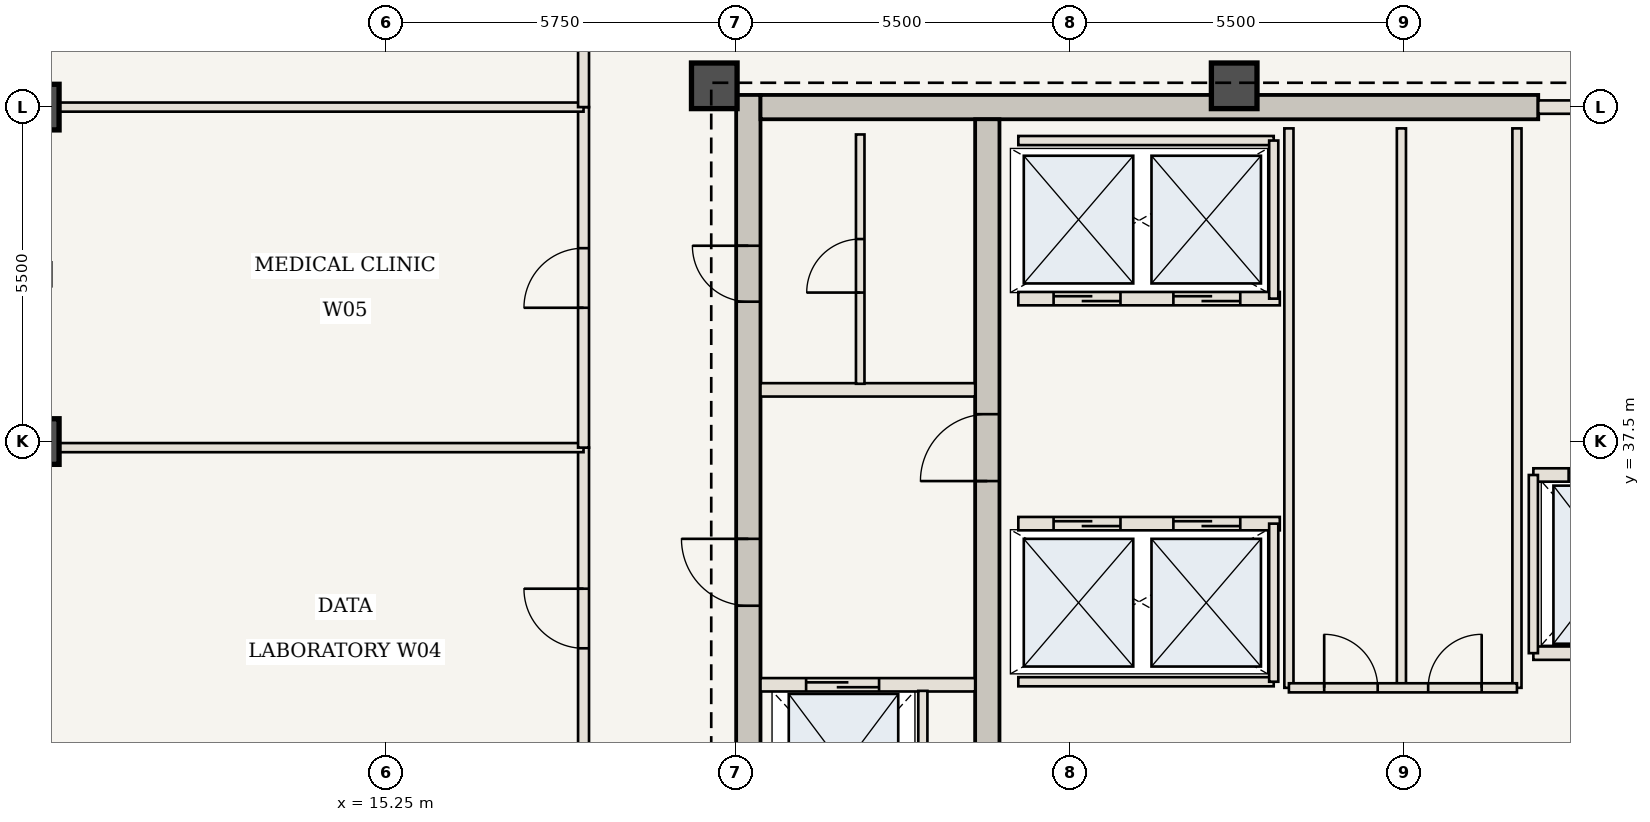
"""IFC4 building model, lengths in metres.
Left out: names, types, materials, properties, quantities, classifications, styles, units other than length and angle.
Written with IfcOpenShell. Run it as: python <this file> out.ifc"""

import sys

from ifc_helpers import new_model, si_unit, direction, frame, frame_2d, origin, origin_2d, place, context, subcontext, project, spatial, rectangle, extrude, element, fill, save


model = new_model("IFC4")
c1 = context("Model", 3, precision=1e-05, world=origin(), true_north=direction((0.0, 1.0)))
c2 = subcontext(c1, "Body", "Model", "MODEL_VIEW")
j1 = project(units=[si_unit("LENGTHUNIT", "METRE"), si_unit("PLANEANGLEUNIT", "RADIAN")], contexts=[c1])
p1 = place(None, origin())
s1 = spatial("IfcSite", under=j1, at=p1, CompositionType="ELEMENT")
p2 = place(p1, origin())
s2 = spatial("IfcBuilding", under=s1, at=p2, CompositionType="ELEMENT")
p3 = place(p2, frame((0.0, 0.0, 304.5)))
s3 = spatial("IfcBuildingStorey", under=s2, at=p3, CompositionType="ELEMENT", Elevation=304.5)
p4 = place(p3, frame((21.21, 30.6, 0.0), z_axis=(0.0, 0.0, 1.0), x_axis=(0.0, 1.0, 0.0)))
e1 = element("IfcWall", 1, at=p4, inside=s3, PredefinedType="SHEAR", context=c2, shape_type="SweptSolid", body=[
    extrude(rectangle(XDim=12.6, YDim=0.4, at=frame_2d((6.3, 0.0))), origin(), (0.0, 0.0, 1.0), 3.85),
])
p5 = place(p4, frame((4.2, 0.0, 0.0)))
e2 = element("IfcOpeningElement", 2, at=p5, cuts=e1, PredefinedType="OPENING", context=c2, shape_type="SweptSolid", body=[
    extrude(rectangle(XDim=1.1, YDim=2.15, at=frame_2d((0.55, 1.075))), frame((0.0, 0.21, 0.0), z_axis=(0.0, -1.0, 0.0), x_axis=(1.0, 0.0, 0.0)), (0.0, 0.0, 1.0), 0.42),
])
p6 = place(p4, frame((9.2, 0.0, 0.0)))
e3 = element("IfcOpeningElement", 3, at=p6, cuts=e1, PredefinedType="OPENING", context=c2, shape_type="SweptSolid", body=[
    extrude(rectangle(XDim=0.92, YDim=2.1, at=frame_2d((0.46, 1.05))), frame((0.0, 0.21, 0.0), z_axis=(0.0, -1.0, 0.0), x_axis=(1.0, 0.0, 0.0)), (0.0, 0.0, 1.0), 0.42),
])
p7 = place(p3, frame((21.41, 43.0, 0.0), z_axis=(0.0, 0.0, 1.0), x_axis=(1.0, 0.0, 0.0)))
e4 = element("IfcWall", 4, at=p7, inside=s3, PredefinedType="SHEAR", context=c2, shape_type="SweptSolid", body=[
    extrude(rectangle(XDim=12.79, YDim=0.4, at=frame_2d((6.395, 0.0))), origin(), (0.0, 0.0, 1.0), 3.85),
])
p8 = place(p3, frame((25.14, 30.6, 0.0), z_axis=(0.0, 0.0, 1.0), x_axis=(0.0, 1.0, 0.0)))
e5 = element("IfcWall", 5, at=p8, inside=s3, PredefinedType="SHEAR", context=c2, shape_type="SweptSolid", body=[
    extrude(rectangle(XDim=12.2, YDim=0.4, at=frame_2d((6.1, 0.0))), origin(), (0.0, 0.0, 1.0), 3.85),
])
p9 = place(p8, frame((6.25, 0.0, 0.0)))
e6 = element("IfcOpeningElement", 6, at=p9, cuts=e5, PredefinedType="OPENING", context=c2, shape_type="SweptSolid", body=[
    extrude(rectangle(XDim=1.1, YDim=2.15, at=frame_2d((0.55, 1.075))), frame((0.0, 0.21, 0.0), z_axis=(0.0, -1.0, 0.0), x_axis=(1.0, 0.0, 0.0)), (0.0, 0.0, 1.0), 0.42),
])
for number, where, z_axis, x_axis in (
    (7, (29.2, 43.35, 0.0), (0.0, 0.0, 1.0), (1.0, 0.0, 0.0)),
    (8, (20.65, 43.35, 0.0), (0.0, 0.0, 1.0), (1.0, 0.0, 0.0)),
    (9, (9.5, 37.5, 0.0), (0.0, 0.0, 1.0), (1.0, 0.0, 0.0)),
    (10, (9.5, 43.0, 0.0), (0.0, 0.0, 1.0), (1.0, 0.0, 0.0)),
):
    element("IfcColumn", number, at=place(p3, frame(where, z_axis=z_axis, x_axis=x_axis)), inside=s3, PredefinedType="COLUMN", context=c2, shape_type="SweptSolid", body=[
        extrude(rectangle(XDim=0.75, YDim=0.75, at=origin_2d()), origin(), (0.0, 0.0, 1.0), 3.85),
    ])
p10 = place(p3, frame((21.41, 33.5, 0.0), z_axis=(0.0, 0.0, 1.0), x_axis=(1.0, 0.0, 0.0)))
e11 = element("IfcWall", 11, at=p10, inside=s3, PredefinedType="STANDARD", context=c2, shape_type="SweptSolid", body=[
    extrude(rectangle(XDim=3.53, YDim=0.22, at=frame_2d((1.765, 0.0))), origin(), (0.0, 0.0, 1.0), 3.63),
])
p11 = place(p10, frame((0.75, 0.0, 0.0)))
e12 = element("IfcOpeningElement", 12, at=p11, cuts=e11, PredefinedType="OPENING", context=c2, shape_type="SweptSolid", body=[
    extrude(rectangle(XDim=1.2, YDim=2.2, at=frame_2d((0.6, 1.1))), frame((0.0, 0.12, 0.0), z_axis=(0.0, -1.0, 0.0), x_axis=(1.0, 0.0, 0.0)), (0.0, 0.0, 1.0), 0.24),
])
p12 = place(p3, frame((24.08, 30.75, 0.0), z_axis=(0.0, 0.0, 1.0), x_axis=(0.0, 1.0, 0.0)))
e13 = element("IfcWall", 13, at=p12, inside=s3, PredefinedType="STANDARD", context=c2, shape_type="SweptSolid", body=[
    extrude(rectangle(XDim=2.65, YDim=0.15, at=frame_2d((1.325, 0.0))), origin(), (0.0, 0.0, 1.0), 3.63),
])
p13 = place(p3, frame((21.41, 38.35, 0.0), z_axis=(0.0, 0.0, 1.0), x_axis=(1.0, 0.0, 0.0)))
e14 = element("IfcWall", 14, at=p13, inside=s3, PredefinedType="STANDARD", context=c2, shape_type="SweptSolid", body=[
    extrude(rectangle(XDim=3.53, YDim=0.22, at=frame_2d((1.765, 0.0))), origin(), (0.0, 0.0, 1.0), 3.63),
])
p14 = place(p3, frame((23.05, 38.45, 0.0), z_axis=(0.0, 0.0, 1.0), x_axis=(0.0, 1.0, 0.0)))
e15 = element("IfcWall", 15, at=p14, inside=s3, PredefinedType="STANDARD", context=c2, shape_type="SweptSolid", body=[
    extrude(rectangle(XDim=4.1, YDim=0.14, at=frame_2d((2.05, 0.0))), origin(), (0.0, 0.0, 1.0), 3.63),
])
p15 = place(p14, frame((1.5, 0.0, 0.0)))
e16 = element("IfcOpeningElement", 16, at=p15, cuts=e15, PredefinedType="OPENING", context=c2, shape_type="SweptSolid", body=[
    extrude(rectangle(XDim=0.88, YDim=2.1, at=frame_2d((0.44, 1.05))), frame((0.0, 0.08, 0.0), z_axis=(0.0, -1.0, 0.0), x_axis=(1.0, 0.0, 0.0)), (0.0, 0.0, 1.0), 0.16),
])
p16 = place(p3, frame((25.65, 36.15, 0.0), z_axis=(0.0, 0.0, 1.0), x_axis=(1.0, 0.0, 0.0)))
e17 = element("IfcWall", 17, at=p16, inside=s3, PredefinedType="STANDARD", context=c2, shape_type="SweptSolid", body=[
    extrude(rectangle(XDim=4.3, YDim=0.22, at=frame_2d((2.15, 0.0))), origin(), (0.0, 0.0, 1.0), 3.63),
])
p17 = place(p16, frame((0.58, 0.0, 0.0)))
e18 = element("IfcOpeningElement", 18, at=p17, cuts=e17, PredefinedType="OPENING", context=c2, shape_type="SweptSolid", body=[
    extrude(rectangle(XDim=1.1, YDim=2.15, at=frame_2d((0.55, 1.075))), frame((0.0, 0.12, 0.0), z_axis=(0.0, -1.0, 0.0), x_axis=(1.0, 0.0, 0.0)), (0.0, 0.0, 1.0), 0.24),
])
p18 = place(p16, frame((2.55, 0.0, 0.0)))
e19 = element("IfcOpeningElement", 19, at=p18, cuts=e17, PredefinedType="OPENING", context=c2, shape_type="SweptSolid", body=[
    extrude(rectangle(XDim=1.1, YDim=2.15, at=frame_2d((0.55, 1.075))), frame((0.0, 0.12, 0.0), z_axis=(0.0, -1.0, 0.0), x_axis=(1.0, 0.0, 0.0)), (0.0, 0.0, 1.0), 0.24),
])
p19 = place(p3, frame((25.65, 33.55, 0.0), z_axis=(0.0, 0.0, 1.0), x_axis=(1.0, 0.0, 0.0)))
e20 = element("IfcWall", 20, at=p19, inside=s3, PredefinedType="STANDARD", context=c2, shape_type="SweptSolid", body=[
    extrude(rectangle(XDim=4.2, YDim=0.15, at=frame_2d((2.1, 0.0))), origin(), (0.0, 0.0, 1.0), 3.63),
])
p20 = place(p3, frame((29.85, 33.55, 0.0), z_axis=(0.0, 0.0, 1.0), x_axis=(0.0, 1.0, 0.0)))
e21 = element("IfcWall", 21, at=p20, inside=s3, PredefinedType="STANDARD", context=c2, shape_type="SweptSolid", body=[
    extrude(rectangle(XDim=2.6, YDim=0.15, at=frame_2d((1.3, 0.0))), origin(), (0.0, 0.0, 1.0), 3.63),
])
p21 = place(p3, frame((25.65, 39.85, 0.0), z_axis=(0.0, 0.0, 1.0), x_axis=(1.0, 0.0, 0.0)))
e22 = element("IfcWall", 22, at=p21, inside=s3, PredefinedType="STANDARD", context=c2, shape_type="SweptSolid", body=[
    extrude(rectangle(XDim=4.3, YDim=0.22, at=frame_2d((2.15, 0.0))), origin(), (0.0, 0.0, 1.0), 3.63),
])
p22 = place(p21, frame((0.58, 0.0, 0.0)))
e23 = element("IfcOpeningElement", 23, at=p22, cuts=e22, PredefinedType="OPENING", context=c2, shape_type="SweptSolid", body=[
    extrude(rectangle(XDim=1.1, YDim=2.15, at=frame_2d((0.55, 1.075))), frame((0.0, 0.12, 0.0), z_axis=(0.0, -1.0, 0.0), x_axis=(1.0, 0.0, 0.0)), (0.0, 0.0, 1.0), 0.24),
])
p23 = place(p21, frame((2.55, 0.0, 0.0)))
e24 = element("IfcOpeningElement", 24, at=p23, cuts=e22, PredefinedType="OPENING", context=c2, shape_type="SweptSolid", body=[
    extrude(rectangle(XDim=1.1, YDim=2.15, at=frame_2d((0.55, 1.075))), frame((0.0, 0.12, 0.0), z_axis=(0.0, -1.0, 0.0), x_axis=(1.0, 0.0, 0.0)), (0.0, 0.0, 1.0), 0.24),
])
p24 = place(p3, frame((25.65, 42.45, 0.0), z_axis=(0.0, 0.0, 1.0), x_axis=(1.0, 0.0, 0.0)))
e25 = element("IfcWall", 25, at=p24, inside=s3, PredefinedType="STANDARD", context=c2, shape_type="SweptSolid", body=[
    extrude(rectangle(XDim=4.2, YDim=0.15, at=frame_2d((2.1, 0.0))), origin(), (0.0, 0.0, 1.0), 3.63),
])
p25 = place(p3, frame((29.85, 39.85, 0.0), z_axis=(0.0, 0.0, 1.0), x_axis=(0.0, 1.0, 0.0)))
e26 = element("IfcWall", 26, at=p25, inside=s3, PredefinedType="STANDARD", context=c2, shape_type="SweptSolid", body=[
    extrude(rectangle(XDim=2.6, YDim=0.15, at=frame_2d((1.3, 0.0))), origin(), (0.0, 0.0, 1.0), 3.63),
])
for number, where, z_axis, x_axis in (
    (27, (30.1, 33.45, 0.0), (0.0, 0.0, 1.0), (0.0, 1.0, 0.0)),
    (28, (31.95, 33.45, 0.0), (0.0, 0.0, 1.0), (0.0, 1.0, 0.0)),
    (29, (33.85, 33.45, 0.0), (0.0, 0.0, 1.0), (0.0, 1.0, 0.0)),
):
    element("IfcWall", number, at=place(p3, frame(where, z_axis=z_axis, x_axis=x_axis)), inside=s3, PredefinedType="STANDARD", context=c2, shape_type="SweptSolid", body=[
        extrude(rectangle(XDim=9.2, YDim=0.15, at=frame_2d((4.6, 0.0))), origin(), (0.0, 0.0, 1.0), 3.63),
    ])
p26 = place(p3, frame((30.1, 33.45, 0.0), z_axis=(0.0, 0.0, 1.0), x_axis=(1.0, 0.0, 0.0)))
e30 = element("IfcWall", 30, at=p26, inside=s3, PredefinedType="STANDARD", context=c2, shape_type="SweptSolid", body=[
    extrude(rectangle(XDim=3.75, YDim=0.15, at=frame_2d((1.875, 0.0))), origin(), (0.0, 0.0, 1.0), 3.63),
])
p27 = place(p26, frame((0.58, 0.0, 0.0)))
e31 = element("IfcOpeningElement", 31, at=p27, cuts=e30, PredefinedType="OPENING", context=c2, shape_type="SweptSolid", body=[
    extrude(rectangle(XDim=0.88, YDim=2.1, at=frame_2d((0.44, 1.05))), frame((0.0, 0.085, 0.0), z_axis=(0.0, -1.0, 0.0), x_axis=(1.0, 0.0, 0.0)), (0.0, 0.0, 1.0), 0.17),
])
p28 = place(p26, frame((2.29, 0.0, 0.0)))
e32 = element("IfcOpeningElement", 32, at=p28, cuts=e30, PredefinedType="OPENING", context=c2, shape_type="SweptSolid", body=[
    extrude(rectangle(XDim=0.88, YDim=2.1, at=frame_2d((0.44, 1.05))), frame((0.0, 0.085, 0.0), z_axis=(0.0, -1.0, 0.0), x_axis=(1.0, 0.0, 0.0)), (0.0, 0.0, 1.0), 0.17),
])
p29 = place(p3, frame((34.2, 43.0, 0.0), z_axis=(0.0, 0.0, 1.0), x_axis=(1.0, 0.0, 0.0)))
e33 = element("IfcWall", 33, at=p29, inside=s3, PredefinedType="STANDARD", context=c2, shape_type="SweptSolid", body=[
    extrude(rectangle(XDim=3.55, YDim=0.22, at=frame_2d((1.775, 0.0))), origin(), (0.0, 0.0, 1.0), 3.63),
])
p30 = place(p29, frame((1.4, 0.0, 0.0)))
e34 = element("IfcOpeningElement", 34, at=p30, cuts=e33, PredefinedType="OPENING", context=c2, shape_type="SweptSolid", body=[
    extrude(rectangle(XDim=1.1, YDim=2.15, at=frame_2d((0.55, 1.075))), frame((0.0, 0.12, 0.0), z_axis=(0.0, -1.0, 0.0), x_axis=(1.0, 0.0, 0.0)), (0.0, 0.0, 1.0), 0.24),
])
p31 = place(p3, frame((34.12, 36.95, 0.0), z_axis=(0.0, 0.0, 1.0), x_axis=(1.0, 0.0, 0.0)))
e35 = element("IfcWall", 35, at=p31, inside=s3, PredefinedType="STANDARD", context=c2, shape_type="SweptSolid", body=[
    extrude(rectangle(XDim=2.68, YDim=0.22, at=frame_2d((1.34, 0.0))), origin(), (0.0, 0.0, 1.0), 3.63),
])
p32 = place(p31, frame((0.58, 0.0, 0.0)))
e36 = element("IfcOpeningElement", 36, at=p32, cuts=e35, PredefinedType="OPENING", context=c2, shape_type="SweptSolid", body=[
    extrude(rectangle(XDim=1.2, YDim=2.2, at=frame_2d((0.6, 1.1))), frame((0.0, 0.12, 0.0), z_axis=(0.0, -1.0, 0.0), x_axis=(1.0, 0.0, 0.0)), (0.0, 0.0, 1.0), 0.24),
])
p33 = place(p3, frame((34.12, 34.02, 0.0), z_axis=(0.0, 0.0, 1.0), x_axis=(1.0, 0.0, 0.0)))
e37 = element("IfcWall", 37, at=p33, inside=s3, PredefinedType="STANDARD", context=c2, shape_type="SweptSolid", body=[
    extrude(rectangle(XDim=2.68, YDim=0.22, at=frame_2d((1.34, 0.0))), origin(), (0.0, 0.0, 1.0), 3.63),
])
p34 = place(p3, frame((34.12, 34.02, 0.0), z_axis=(0.0, 0.0, 1.0), x_axis=(0.0, 1.0, 0.0)))
e38 = element("IfcWall", 38, at=p34, inside=s3, PredefinedType="STANDARD", context=c2, shape_type="SweptSolid", body=[
    extrude(rectangle(XDim=2.93, YDim=0.15, at=frame_2d((1.465, 0.0))), origin(), (0.0, 0.0, 1.0), 3.63),
])
p35 = place(p3, frame((18.5, 31.8, 0.0), z_axis=(0.0, 0.0, 1.0), x_axis=(0.0, 1.0, 0.0)))
e39 = element("IfcWall", 39, at=p35, inside=s3, PredefinedType="STANDARD", context=c2, shape_type="SweptSolid", body=[
    extrude(rectangle(XDim=5.6, YDim=0.18, at=frame_2d((2.8, 0.0))), origin(), (0.0, 0.0, 1.0), 3.63),
])
p36 = place(p35, frame((2.3, 0.0, 0.0)))
e40 = element("IfcOpeningElement", 40, at=p36, cuts=e39, PredefinedType="OPENING", context=c2, shape_type="SweptSolid", body=[
    extrude(rectangle(XDim=0.98, YDim=2.2, at=frame_2d((0.49, 1.1))), frame((0.0, 0.1, 0.0), z_axis=(0.0, -1.0, 0.0), x_axis=(1.0, 0.0, 0.0)), (0.0, 0.0, 1.0), 0.2),
])
p37 = place(p3, frame((9.56, 37.4, 0.0), z_axis=(0.0, 0.0, 1.0), x_axis=(1.0, 0.0, 0.0)))
e41 = element("IfcWall", 41, at=p37, inside=s3, PredefinedType="STANDARD", context=c2, shape_type="SweptSolid", body=[
    extrude(rectangle(XDim=8.94, YDim=0.15, at=frame_2d((4.47, 0.0))), origin(), (0.0, 0.0, 1.0), 3.63),
])
p38 = place(p3, frame((18.5, 37.4, 0.0), z_axis=(0.0, 0.0, 1.0), x_axis=(0.0, 1.0, 0.0)))
e42 = element("IfcWall", 42, at=p38, inside=s3, PredefinedType="STANDARD", context=c2, shape_type="SweptSolid", body=[
    extrude(rectangle(XDim=5.6, YDim=0.18, at=frame_2d((2.8, 0.0))), origin(), (0.0, 0.0, 1.0), 3.63),
])
p39 = place(p38, frame((2.3, 0.0, 0.0)))
e43 = element("IfcOpeningElement", 43, at=p39, cuts=e42, PredefinedType="OPENING", context=c2, shape_type="SweptSolid", body=[
    extrude(rectangle(XDim=0.98, YDim=2.2, at=frame_2d((0.49, 1.1))), frame((0.0, 0.1, 0.0), z_axis=(0.0, -1.0, 0.0), x_axis=(1.0, 0.0, 0.0)), (0.0, 0.0, 1.0), 0.2),
])
p40 = place(p3, frame((9.56, 43.0, 0.0), z_axis=(0.0, 0.0, 1.0), x_axis=(1.0, 0.0, 0.0)))
e44 = element("IfcWall", 44, at=p40, inside=s3, PredefinedType="STANDARD", context=c2, shape_type="SweptSolid", body=[
    extrude(rectangle(XDim=8.94, YDim=0.15, at=frame_2d((4.47, 0.0))), origin(), (0.0, 0.0, 1.0), 3.63),
])
p41 = place(p3, frame((18.5, 43.0, 0.0), z_axis=(0.0, 0.0, 1.0), x_axis=(0.0, 1.0, 0.0)))
e45 = element("IfcWall", 45, at=p41, inside=s3, PredefinedType="STANDARD", context=c2, shape_type="SweptSolid", body=[
    extrude(rectangle(XDim=5.5, YDim=0.18, at=frame_2d((2.75, 0.0))), origin(), (0.0, 0.0, 1.0), 3.63),
])
p42 = place(p41, frame((2.25, 0.0, 0.0)))
e46 = element("IfcOpeningElement", 46, at=p42, cuts=e45, PredefinedType="OPENING", context=c2, shape_type="SweptSolid", body=[
    extrude(rectangle(XDim=0.98, YDim=2.2, at=frame_2d((0.49, 1.1))), frame((0.0, 0.1, 0.0), z_axis=(0.0, -1.0, 0.0), x_axis=(1.0, 0.0, 0.0)), (0.0, 0.0, 1.0), 0.2),
])
p43 = place(p5, origin())
e47 = element("IfcDoor", 47, at=p43, inside=s3, OperationType="SINGLE_SWING_RIGHT", PredefinedType="DOOR", context=c2, shape_type="SweptSolid", body=[
    extrude(rectangle(XDim=1.1, YDim=2.15, at=frame_2d((0.55, 1.075))), frame((0.0, 0.025, 0.0), z_axis=(0.0, -1.0, 0.0), x_axis=(1.0, 0.0, 0.0)), (0.0, 0.0, 1.0), 0.05),
])
fill(e2, e47)
p44 = place(p9, origin())
e48 = element("IfcDoor", 48, at=p44, inside=s3, OperationType="SINGLE_SWING_LEFT", PredefinedType="DOOR", context=c2, shape_type="SweptSolid", body=[
    extrude(rectangle(XDim=1.1, YDim=2.15, at=frame_2d((0.55, 1.075))), frame((0.0, 0.025, 0.0), z_axis=(0.0, -1.0, 0.0), x_axis=(1.0, 0.0, 0.0)), (0.0, 0.0, 1.0), 0.05),
])
fill(e6, e48)
p45 = place(p6, origin())
e49 = element("IfcDoor", 49, at=p45, inside=s3, OperationType="SINGLE_SWING_RIGHT", PredefinedType="DOOR", context=c2, shape_type="SweptSolid", body=[
    extrude(rectangle(XDim=0.92, YDim=2.1, at=frame_2d((0.46, 1.05))), frame((0.0, 0.025, 0.0), z_axis=(0.0, -1.0, 0.0), x_axis=(1.0, 0.0, 0.0)), (0.0, 0.0, 1.0), 0.05),
])
fill(e3, e49)
p46 = place(p11, origin())
e50 = element("IfcDoor", 50, at=p46, inside=s3, OperationType="DOUBLE_DOOR_SLIDING", PredefinedType="DOOR", context=c2, shape_type="SweptSolid", body=[
    extrude(rectangle(XDim=1.2, YDim=2.2, at=frame_2d((0.6, 1.1))), frame((0.0, 0.025, 0.0), z_axis=(0.0, -1.0, 0.0), x_axis=(1.0, 0.0, 0.0)), (0.0, 0.0, 1.0), 0.05),
])
fill(e12, e50)
p47 = place(p15, origin())
e51 = element("IfcDoor", 51, at=p47, inside=s3, OperationType="SINGLE_SWING_LEFT", PredefinedType="DOOR", context=c2, shape_type="SweptSolid", body=[
    extrude(rectangle(XDim=0.88, YDim=2.1, at=frame_2d((0.44, 1.05))), frame((0.0, 0.025, 0.0), z_axis=(0.0, -1.0, 0.0), x_axis=(1.0, 0.0, 0.0)), (0.0, 0.0, 1.0), 0.05),
])
fill(e16, e51)
p48 = place(p17, origin())
e52 = element("IfcDoor", 52, at=p48, inside=s3, OperationType="DOUBLE_DOOR_SLIDING", PredefinedType="DOOR", context=c2, shape_type="SweptSolid", body=[
    extrude(rectangle(XDim=1.1, YDim=2.15, at=frame_2d((0.55, 1.075))), frame((0.0, 0.025, 0.0), z_axis=(0.0, -1.0, 0.0), x_axis=(1.0, 0.0, 0.0)), (0.0, 0.0, 1.0), 0.05),
])
fill(e18, e52)
p49 = place(p18, origin())
e53 = element("IfcDoor", 53, at=p49, inside=s3, OperationType="DOUBLE_DOOR_SLIDING", PredefinedType="DOOR", context=c2, shape_type="SweptSolid", body=[
    extrude(rectangle(XDim=1.1, YDim=2.15, at=frame_2d((0.55, 1.075))), frame((0.0, 0.025, 0.0), z_axis=(0.0, -1.0, 0.0), x_axis=(1.0, 0.0, 0.0)), (0.0, 0.0, 1.0), 0.05),
])
fill(e19, e53)
p50 = place(p22, origin())
e54 = element("IfcDoor", 54, at=p50, inside=s3, OperationType="DOUBLE_DOOR_SLIDING", PredefinedType="DOOR", context=c2, shape_type="SweptSolid", body=[
    extrude(rectangle(XDim=1.1, YDim=2.15, at=frame_2d((0.55, 1.075))), frame((0.0, 0.025, 0.0), z_axis=(0.0, -1.0, 0.0), x_axis=(1.0, 0.0, 0.0)), (0.0, 0.0, 1.0), 0.05),
])
fill(e23, e54)
p51 = place(p23, origin())
e55 = element("IfcDoor", 55, at=p51, inside=s3, OperationType="DOUBLE_DOOR_SLIDING", PredefinedType="DOOR", context=c2, shape_type="SweptSolid", body=[
    extrude(rectangle(XDim=1.1, YDim=2.15, at=frame_2d((0.55, 1.075))), frame((0.0, 0.025, 0.0), z_axis=(0.0, -1.0, 0.0), x_axis=(1.0, 0.0, 0.0)), (0.0, 0.0, 1.0), 0.05),
])
fill(e24, e55)
p52 = place(p27, origin())
e56 = element("IfcDoor", 56, at=p52, inside=s3, OperationType="SINGLE_SWING_LEFT", PredefinedType="DOOR", context=c2, shape_type="SweptSolid", body=[
    extrude(rectangle(XDim=0.88, YDim=2.1, at=frame_2d((0.44, 1.05))), frame((0.0, 0.025, 0.0), z_axis=(0.0, -1.0, 0.0), x_axis=(1.0, 0.0, 0.0)), (0.0, 0.0, 1.0), 0.05),
])
fill(e31, e56)
p53 = place(p28, origin())
e57 = element("IfcDoor", 57, at=p53, inside=s3, OperationType="SINGLE_SWING_RIGHT", PredefinedType="DOOR", context=c2, shape_type="SweptSolid", body=[
    extrude(rectangle(XDim=0.88, YDim=2.1, at=frame_2d((0.44, 1.05))), frame((0.0, 0.025, 0.0), z_axis=(0.0, -1.0, 0.0), x_axis=(1.0, 0.0, 0.0)), (0.0, 0.0, 1.0), 0.05),
])
fill(e32, e57)
p54 = place(p32, origin())
e58 = element("IfcDoor", 58, at=p54, inside=s3, OperationType="DOUBLE_DOOR_SLIDING", PredefinedType="DOOR", context=c2, shape_type="SweptSolid", body=[
    extrude(rectangle(XDim=1.2, YDim=2.2, at=frame_2d((0.6, 1.1))), frame((0.0, 0.025, 0.0), z_axis=(0.0, -1.0, 0.0), x_axis=(1.0, 0.0, 0.0)), (0.0, 0.0, 1.0), 0.05),
])
fill(e36, e58)
p55 = place(p36, origin())
e59 = element("IfcDoor", 59, at=p55, inside=s3, OperationType="SINGLE_SWING_RIGHT", PredefinedType="DOOR", context=c2, shape_type="SweptSolid", body=[
    extrude(rectangle(XDim=0.98, YDim=2.2, at=frame_2d((0.49, 1.1))), frame((0.0, 0.025, 0.0), z_axis=(0.0, -1.0, 0.0), x_axis=(1.0, 0.0, 0.0)), (0.0, 0.0, 1.0), 0.05),
])
fill(e40, e59)
p56 = place(p39, origin())
e60 = element("IfcDoor", 60, at=p56, inside=s3, OperationType="SINGLE_SWING_LEFT", PredefinedType="DOOR", context=c2, shape_type="SweptSolid", body=[
    extrude(rectangle(XDim=0.98, YDim=2.2, at=frame_2d((0.49, 1.1))), frame((0.0, 0.025, 0.0), z_axis=(0.0, -1.0, 0.0), x_axis=(1.0, 0.0, 0.0)), (0.0, 0.0, 1.0), 0.05),
])
fill(e43, e60)
save(model, sys.argv[1])
